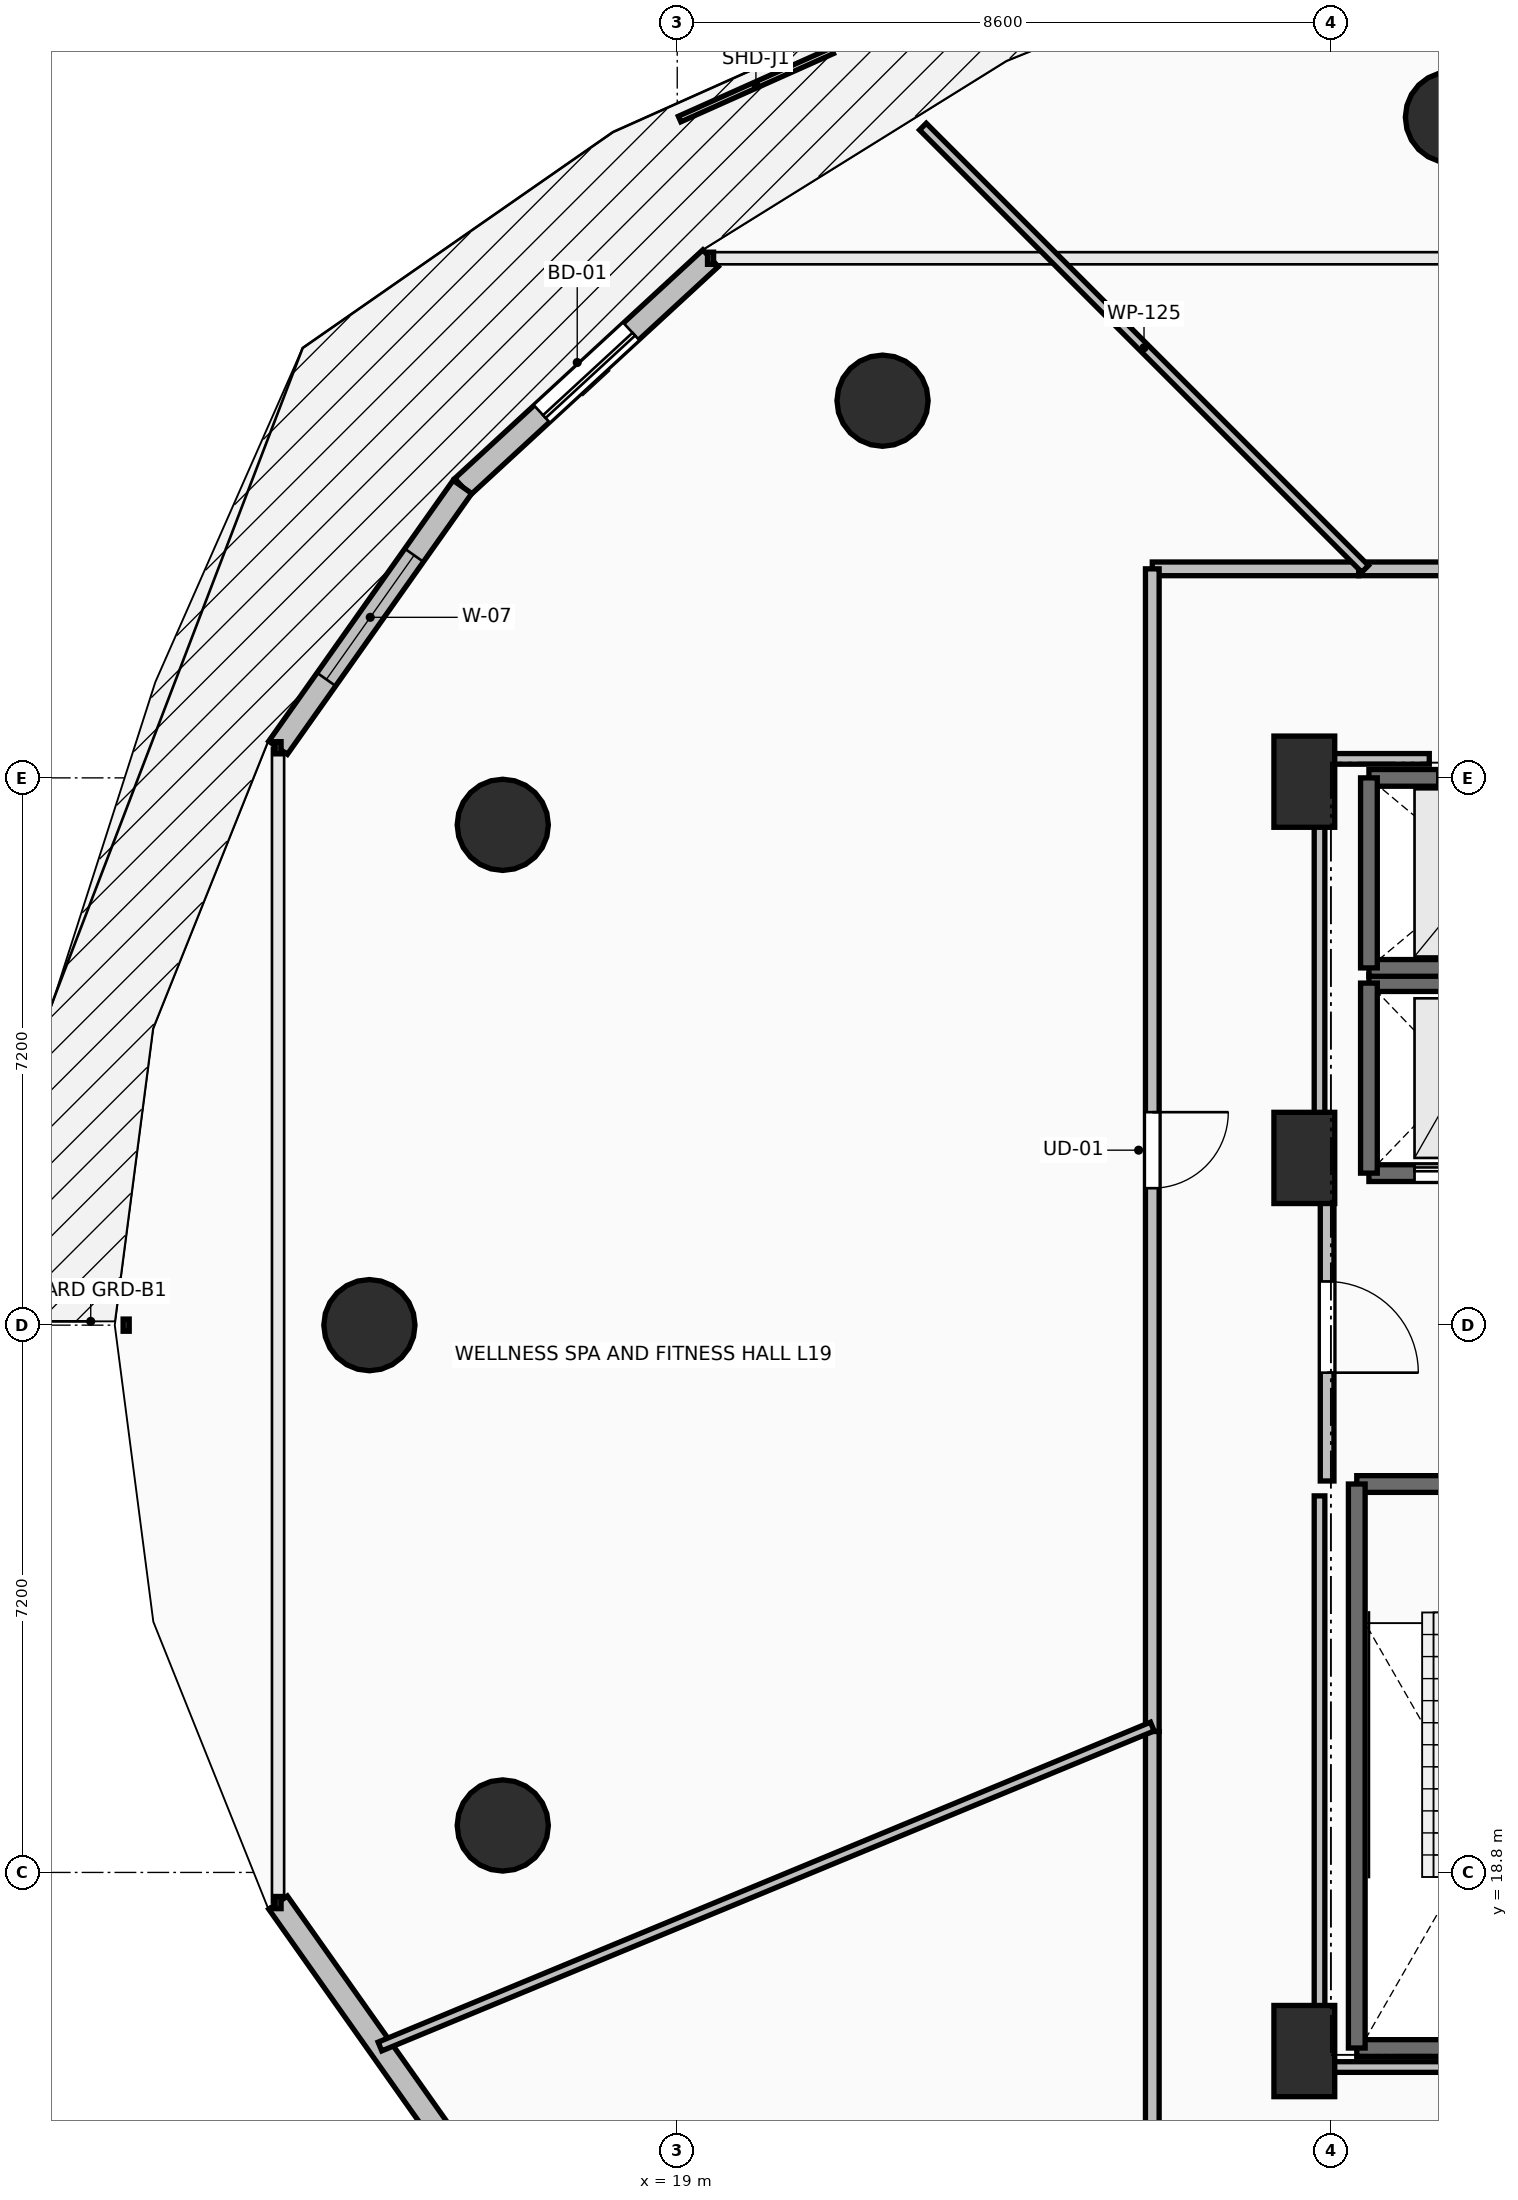
"""IFC4 building model, lengths in metres.
Left out: names, types, materials, properties, quantities, classifications, styles, units other than length and angle.
Written with IfcOpenShell. Run it as: python <this file> out.ifc"""

import sys

from ifc_helpers import new_model, si_unit, direction, frame, frame_2d, origin, origin_2d, place, context, subcontext, project, spatial, rectangle, circle, extrude, element, fill, save


model = new_model("IFC4")
c1 = context("Model", 3, precision=1e-05, world=origin(), true_north=direction((0.0, 1.0)))
c2 = subcontext(c1, "Body", "Model", "MODEL_VIEW")
j1 = project(units=[si_unit("LENGTHUNIT", "METRE"), si_unit("PLANEANGLEUNIT", "RADIAN")], contexts=[c1])
p1 = place(None, origin())
s1 = spatial("IfcSite", under=j1, at=p1, CompositionType="ELEMENT")
p2 = place(p1, origin())
s2 = spatial("IfcBuilding", under=s1, at=p2, CompositionType="ELEMENT")
p3 = place(p2, frame((0.0, 0.0, 74.3)))
s3 = spatial("IfcBuildingStorey", under=s2, at=p3, CompositionType="ELEMENT", Elevation=74.3)
for number, where, z_axis, x_axis in (
    (1, (29.179, 41.891, 0.0), (0.0, 0.0, 1.0), (-0.383, 0.924, 0.0)),
    (2, (21.701, 38.162, 0.0), (0.0, 0.0, 1.0), (-0.707, 0.707, 0.0)),
    (3, (16.705, 32.582, 0.0), (0.0, 0.0, 1.0), (-0.924, 0.383, 0.0)),
    (4, (14.95, 26.0, 0.0), (0.0, 0.0, 1.0), (-1.0, 0.0, 0.0)),
    (5, (16.705, 19.418, 0.0), (0.0, 0.0, 1.0), (-0.924, -0.383, 0.0)),
):
    element("IfcColumn", number, at=place(p3, frame(where, z_axis=z_axis, x_axis=x_axis)), inside=s3, PredefinedType="COLUMN", context=c2, shape_type="SweptSolid", body=[
        extrude(circle(Radius=0.6, at=origin_2d()), origin(), (0.0, 0.0, 1.0), 4.5),
    ])
for number, where, z_axis, x_axis in (
    (6, (27.25, 16.45, 0.0), (0.0, 0.0, 1.0), (1.0, 0.0, 0.0)),
    (7, (27.25, 28.2, 0.0), (0.0, 0.0, 1.0), (1.0, 0.0, 0.0)),
    (8, (27.25, 33.15, 0.0), (0.0, 0.0, 1.0), (1.0, 0.0, 0.0)),
):
    element("IfcColumn", number, at=place(p3, frame(where, z_axis=z_axis, x_axis=x_axis)), inside=s3, PredefinedType="PILASTER", context=c2, shape_type="SweptSolid", body=[
        extrude(rectangle(XDim=0.8, YDim=1.2, at=origin_2d()), origin(), (0.0, 0.0, 1.0), 4.5),
    ])
p4 = place(p3, frame((19.438, 40.036, 0.0), z_axis=(0.0, 0.0, 1.0), x_axis=(-0.735416718093, -0.677615119924, 0.0)))
e9 = element("IfcWall", 9, at=p4, inside=s3, PredefinedType="STANDARD", context=c2, shape_type="SweptSolid", body=[
    extrude(rectangle(XDim=4.439, YDim=0.3, at=frame_2d((2.22, 0.0))), origin(), (0.0, 0.0, 1.0), 4.24),
])
p5 = place(p4, frame((1.419, 0.0, 0.0)))
e10 = element("IfcOpeningElement", 10, at=p5, cuts=e9, PredefinedType="OPENING", context=c2, shape_type="SweptSolid", body=[
    extrude(rectangle(XDim=1.6, YDim=2.3, at=frame_2d((0.8, 1.15))), frame((0.0, 0.165, 0.0), z_axis=(0.0, -1.0, 0.0), x_axis=(1.0, 0.0, 0.0)), (0.0, 0.0, 1.0), 0.33),
])
p6 = place(p3, frame((16.174, 37.028, 0.0), z_axis=(0.0, 0.0, 1.0), x_axis=(-0.57716435238, -0.81662801222, 0.0)))
e11 = element("IfcWall", 11, at=p6, inside=s3, PredefinedType="STANDARD", context=c2, shape_type="SweptSolid", body=[
    extrude(rectangle(XDim=4.202, YDim=0.3, at=frame_2d((2.101, 0.0))), origin(), (0.0, 0.0, 1.0), 4.24),
])
p7 = place(p6, frame((1.101, 0.0, 0.85)))
e12 = element("IfcOpeningElement", 12, at=p7, cuts=e11, PredefinedType="OPENING", context=c2, shape_type="SweptSolid", body=[
    extrude(rectangle(XDim=2.0, YDim=2.45, at=frame_2d((1.0, 1.225))), frame((0.0, 0.165, 0.0), z_axis=(0.0, -1.0, 0.0), x_axis=(1.0, 0.0, 0.0)), (0.0, 0.0, 1.0), 0.33),
])
p8 = place(p3, frame((13.748, 18.404, 0.0), z_axis=(0.0, 0.0, 1.0), x_axis=(0.57716435238, -0.81662801222, 0.0)))
e13 = element("IfcWall", 13, at=p8, inside=s3, PredefinedType="STANDARD", context=c2, shape_type="SweptSolid", body=[
    extrude(rectangle(XDim=4.202, YDim=0.3, at=frame_2d((2.101, 0.0))), origin(), (0.0, 0.0, 1.0), 4.24),
])
p9 = place(p3, frame((27.94, 23.91, 0.0), z_axis=(0.0, 0.0, 1.0), x_axis=(1.0, 0.0, 0.0)))
e14 = element("IfcWall", 14, at=p9, inside=s3, PredefinedType="SOLIDWALL", context=c2, shape_type="SweptSolid", body=[
    extrude(rectangle(XDim=3.37, YDim=0.22, at=frame_2d((1.685, 0.0))), origin(), (0.0, 0.0, 1.0), 4.24),
])
p10 = place(p9, frame((1.135, 0.0, 0.0)))
e15 = element("IfcOpeningElement", 15, at=p10, cuts=e14, PredefinedType="OPENING", context=c2, shape_type="SweptSolid", body=[
    extrude(rectangle(XDim=1.1, YDim=2.15, at=frame_2d((0.55, 1.075))), frame((0.0, 0.125, 0.0), z_axis=(0.0, -1.0, 0.0), x_axis=(1.0, 0.0, 0.0)), (0.0, 0.0, 1.0), 0.25),
])
p11 = place(p3, frame((31.31, 16.49, 0.0), z_axis=(0.0, 0.0, 1.0), x_axis=(-1.0, 0.0, 0.0)))
e16 = element("IfcWall", 16, at=p11, inside=s3, PredefinedType="SOLIDWALL", context=c2, shape_type="SweptSolid", body=[
    extrude(rectangle(XDim=3.37, YDim=0.22, at=frame_2d((1.685, 0.0))), origin(), (0.0, 0.0, 1.0), 4.24),
])
p12 = place(p3, frame((27.94, 16.49, 0.0), z_axis=(0.0, 0.0, 1.0), x_axis=(0.0, 1.0, 0.0)))
e17 = element("IfcWall", 17, at=p12, inside=s3, PredefinedType="SOLIDWALL", context=c2, shape_type="SweptSolid", body=[
    extrude(rectangle(XDim=7.42, YDim=0.22, at=frame_2d((3.71, 0.0))), origin(), (0.0, 0.0, 1.0), 4.24),
])
p13 = place(p3, frame((28.1, 28.0, 0.0), z_axis=(0.0, 0.0, 1.0), x_axis=(1.0, 0.0, 0.0)))
e18 = element("IfcWall", 18, at=p13, inside=s3, PredefinedType="SHEAR", context=c2, shape_type="SweptSolid", body=[
    extrude(rectangle(XDim=2.4, YDim=0.22, at=frame_2d((1.2, 0.0))), origin(), (0.0, 0.0, 1.0), 4.24),
])
p14 = place(p13, frame((0.6, 0.0, 0.0)))
e19 = element("IfcOpeningElement", 19, at=p14, cuts=e18, PredefinedType="OPENING", context=c2, shape_type="SweptSolid", body=[
    extrude(rectangle(XDim=1.2, YDim=2.2, at=frame_2d((0.6, 1.1))), frame((0.0, 0.125, 0.0), z_axis=(0.0, -1.0, 0.0), x_axis=(1.0, 0.0, 0.0)), (0.0, 0.0, 1.0), 0.25),
])
p15 = place(p3, frame((30.5, 30.5, 0.0), z_axis=(0.0, 0.0, 1.0), x_axis=(-1.0, 0.0, 0.0)))
e20 = element("IfcWall", 20, at=p15, inside=s3, PredefinedType="SHEAR", context=c2, shape_type="SweptSolid", body=[
    extrude(rectangle(XDim=2.4, YDim=0.22, at=frame_2d((1.2, 0.0))), origin(), (0.0, 0.0, 1.0), 4.24),
])
p16 = place(p3, frame((28.1, 30.5, 0.0), z_axis=(0.0, 0.0, 1.0), x_axis=(0.0, -1.0, 0.0)))
e21 = element("IfcWall", 21, at=p16, inside=s3, PredefinedType="SHEAR", context=c2, shape_type="SweptSolid", body=[
    extrude(rectangle(XDim=2.5, YDim=0.22, at=frame_2d((1.25, 0.0))), origin(), (0.0, 0.0, 1.0), 4.24),
])
p17 = place(p3, frame((28.1, 30.7, 0.0), z_axis=(0.0, 0.0, 1.0), x_axis=(1.0, 0.0, 0.0)))
e22 = element("IfcWall", 22, at=p17, inside=s3, PredefinedType="SOLIDWALL", context=c2, shape_type="SweptSolid", body=[
    extrude(rectangle(XDim=3.0, YDim=0.22, at=frame_2d((1.5, 0.0))), origin(), (0.0, 0.0, 1.0), 4.24),
])
p18 = place(p3, frame((31.1, 33.2, 0.0), z_axis=(0.0, 0.0, 1.0), x_axis=(-1.0, 0.0, 0.0)))
e23 = element("IfcWall", 23, at=p18, inside=s3, PredefinedType="SOLIDWALL", context=c2, shape_type="SweptSolid", body=[
    extrude(rectangle(XDim=3.0, YDim=0.22, at=frame_2d((1.5, 0.0))), origin(), (0.0, 0.0, 1.0), 4.24),
])
p19 = place(p18, frame((0.9, 0.0, 0.0)))
e24 = element("IfcOpeningElement", 24, at=p19, cuts=e23, PredefinedType="OPENING", context=c2, shape_type="SweptSolid", body=[
    extrude(rectangle(XDim=1.2, YDim=2.2, at=frame_2d((0.6, 1.1))), frame((0.0, 0.125, 0.0), z_axis=(0.0, -1.0, 0.0), x_axis=(1.0, 0.0, 0.0)), (0.0, 0.0, 1.0), 0.25),
])
p20 = place(p3, frame((28.1, 33.2, 0.0), z_axis=(0.0, 0.0, 1.0), x_axis=(0.0, -1.0, 0.0)))
e25 = element("IfcWall", 25, at=p20, inside=s3, PredefinedType="SOLIDWALL", context=c2, shape_type="SweptSolid", body=[
    extrude(rectangle(XDim=2.5, YDim=0.22, at=frame_2d((1.25, 0.0))), origin(), (0.0, 0.0, 1.0), 4.24),
])
p21 = place(p3, frame((27.55, 28.0, 0.0), z_axis=(0.0, 0.0, 1.0), x_axis=(0.0, -1.0, 0.0)))
e26 = element("IfcWall", 26, at=p21, inside=s3, PredefinedType="PARTITIONING", context=c2, shape_type="SweptSolid", body=[
    extrude(rectangle(XDim=4.05, YDim=0.18, at=frame_2d((2.025, 0.0))), origin(), (0.0, 0.0, 1.0), 4.24),
])
p22 = place(p21, frame((1.425, 0.0, 0.0)))
e27 = element("IfcOpeningElement", 27, at=p22, cuts=e26, PredefinedType="OPENING", context=c2, shape_type="SweptSolid", body=[
    extrude(rectangle(XDim=1.2, YDim=2.15, at=frame_2d((0.6, 1.075))), frame((0.0, 0.105, 0.0), z_axis=(0.0, -1.0, 0.0), x_axis=(1.0, 0.0, 0.0)), (0.0, 0.0, 1.0), 0.21),
])
p23 = place(p3, frame((42.061, 35.95, 0.0), z_axis=(0.0, 0.0, 1.0), x_axis=(-1.0, 0.0, 0.0)))
e28 = element("IfcWall", 28, at=p23, inside=s3, PredefinedType="PARTITIONING", context=c2, shape_type="SweptSolid", body=[
    extrude(rectangle(XDim=14.096, YDim=0.18, at=frame_2d((7.048, 0.0))), origin(), (0.0, 0.0, 1.0), 3.432),
])
p24 = place(p23, frame((6.548, 0.0, 0.0)))
e29 = element("IfcOpeningElement", 29, at=p24, cuts=e28, PredefinedType="OPENING", context=c2, shape_type="SweptSolid", body=[
    extrude(rectangle(XDim=1.0, YDim=2.15, at=frame_2d((0.5, 1.075))), frame((0.0, 0.105, 0.0), z_axis=(0.0, -1.0, 0.0), x_axis=(1.0, 0.0, 0.0)), (0.0, 0.0, 1.0), 0.21),
])
p25 = place(p3, frame((27.965, 35.95, 0.0), z_axis=(0.0, 0.0, 1.0), x_axis=(-1.0, 0.0, 0.0)))
e30 = element("IfcWall", 30, at=p25, inside=s3, PredefinedType="PARTITIONING", context=c2, shape_type="SweptSolid", body=[
    extrude(rectangle(XDim=2.715, YDim=0.18, at=frame_2d((1.357, 0.0))), origin(), (0.0, 0.0, 1.0), 3.432),
])
p26 = place(p3, frame((25.25, 35.95, 0.0), z_axis=(0.0, 0.0, 1.0), x_axis=(0.0, -1.0, 0.0)))
e31 = element("IfcWall", 31, at=p26, inside=s3, PredefinedType="PARTITIONING", context=c2, shape_type="SweptSolid", body=[
    extrude(rectangle(XDim=15.296, YDim=0.18, at=frame_2d((7.648, 0.0))), origin(), (0.0, 0.0, 1.0), 3.432),
])
p27 = place(p26, frame((7.148, 0.0, 0.0)))
e32 = element("IfcOpeningElement", 32, at=p27, cuts=e31, PredefinedType="OPENING", context=c2, shape_type="SweptSolid", body=[
    extrude(rectangle(XDim=1.0, YDim=2.15, at=frame_2d((0.5, 1.075))), frame((0.0, 0.105, 0.0), z_axis=(0.0, -1.0, 0.0), x_axis=(1.0, 0.0, 0.0)), (0.0, 0.0, 1.0), 0.21),
])
p28 = place(p3, frame((25.25, 20.654, 0.0), z_axis=(0.0, 0.0, 1.0), x_axis=(0.0, -1.0, 0.0)))
e33 = element("IfcWall", 33, at=p28, inside=s3, PredefinedType="PARTITIONING", context=c2, shape_type="SweptSolid", body=[
    extrude(rectangle(XDim=6.554, YDim=0.18, at=frame_2d((3.277, 0.0))), origin(), (0.0, 0.0, 1.0), 3.432),
])
p29 = place(p3, frame((22.232, 41.768, 0.0), z_axis=(0.0, 0.0, 1.0), x_axis=(0.707106781187, -0.707106781187, 0.0)))
e34 = element("IfcWall", 34, at=p29, inside=s3, PredefinedType="PARTITIONING", context=c2, shape_type="SweptSolid", body=[
    extrude(rectangle(XDim=8.228, YDim=0.125, at=frame_2d((4.114, 0.0))), origin(), (0.0, 0.0, 1.0), 3.432),
])
p30 = place(p3, frame((15.089, 16.51, 0.0), z_axis=(0.0, 0.0, 1.0), x_axis=(0.923872894692, 0.382699457086, 0.0)))
e35 = element("IfcWall", 35, at=p30, inside=s3, PredefinedType="PARTITIONING", context=c2, shape_type="SweptSolid", body=[
    extrude(rectangle(XDim=10.998, YDim=0.125, at=frame_2d((5.499, 0.0))), origin(), (0.0, 0.0, 1.0), 3.432),
])
p31 = place(p3, frame((31.195, 16.24, 0.0), z_axis=(0.0, 0.0, 1.0), x_axis=(-1.0, 0.0, 0.0)))
e36 = element("IfcWall", 36, at=p31, inside=s3, PredefinedType="PARTITIONING", context=c2, shape_type="SweptSolid", body=[
    extrude(rectangle(XDim=3.745, YDim=0.14, at=frame_2d((1.873, 0.0))), origin(), (0.0, 0.0, 1.0), 3.432),
])
p32 = place(p3, frame((27.45, 16.24, 0.0), z_axis=(0.0, 0.0, 1.0), x_axis=(0.0, 1.0, 0.0)))
e37 = element("IfcWall", 37, at=p32, inside=s3, PredefinedType="PARTITIONING", context=c2, shape_type="SweptSolid", body=[
    extrude(rectangle(XDim=7.514, YDim=0.14, at=frame_2d((3.757, 0.0))), origin(), (0.0, 0.0, 1.0), 3.432),
])
p33 = place(p3, frame((27.45, 28.196, 0.0), z_axis=(0.0, 0.0, 1.0), x_axis=(0.0, 1.0, 0.0)))
e38 = element("IfcWall", 38, at=p33, inside=s3, PredefinedType="PARTITIONING", context=c2, shape_type="SweptSolid", body=[
    extrude(rectangle(XDim=5.254, YDim=0.14, at=frame_2d((2.627, 0.0))), origin(), (0.0, 0.0, 1.0), 3.432),
])
p34 = place(p3, frame((27.45, 33.45, 0.0), z_axis=(0.0, 0.0, 1.0), x_axis=(1.0, 0.0, 0.0)))
e39 = element("IfcWall", 39, at=p34, inside=s3, PredefinedType="PARTITIONING", context=c2, shape_type="SweptSolid", body=[
    extrude(rectangle(XDim=1.444, YDim=0.14, at=frame_2d((0.722, 0.0))), origin(), (0.0, 0.0, 1.0), 3.432),
])
p35 = place(p5, origin())
e40 = element("IfcDoor", 40, at=p35, inside=s3, OperationType="SLIDING_TO_LEFT", PredefinedType="DOOR", context=c2, shape_type="SweptSolid", body=[
    extrude(rectangle(XDim=1.6, YDim=2.3, at=frame_2d((0.8, 1.15))), frame((0.0, 0.025, 0.0), z_axis=(0.0, -1.0, 0.0), x_axis=(1.0, 0.0, 0.0)), (0.0, 0.0, 1.0), 0.05),
])
fill(e10, e40)
p36 = place(p7, origin())
e41 = element("IfcWindow", 41, at=p36, inside=s3, PartitioningType="SINGLE_PANEL", PredefinedType="WINDOW", context=c2, shape_type="SweptSolid", body=[
    extrude(rectangle(XDim=2.0, YDim=2.45, at=frame_2d((1.0, 1.225))), frame((0.0, 0.03, 0.0), z_axis=(0.0, -1.0, 0.0), x_axis=(1.0, 0.0, 0.0)), (0.0, 0.0, 1.0), 0.06),
])
fill(e12, e41)
p37 = place(p14, origin())
e42 = element("IfcDoor", 42, at=p37, inside=s3, OperationType="SLIDING_TO_LEFT", PredefinedType="DOOR", context=c2, shape_type="SweptSolid", body=[
    extrude(rectangle(XDim=1.2, YDim=2.2, at=frame_2d((0.6, 1.1))), frame((0.0, 0.025, 0.0), z_axis=(0.0, -1.0, 0.0), x_axis=(1.0, 0.0, 0.0)), (0.0, 0.0, 1.0), 0.05),
])
fill(e19, e42)
p38 = place(p19, origin())
e43 = element("IfcDoor", 43, at=p38, inside=s3, OperationType="SLIDING_TO_LEFT", PredefinedType="DOOR", context=c2, shape_type="SweptSolid", body=[
    extrude(rectangle(XDim=1.2, YDim=2.2, at=frame_2d((0.6, 1.1))), frame((0.0, 0.025, 0.0), z_axis=(0.0, -1.0, 0.0), x_axis=(1.0, 0.0, 0.0)), (0.0, 0.0, 1.0), 0.05),
])
fill(e24, e43)
p39 = place(p22, origin())
e44 = element("IfcDoor", 44, at=p39, inside=s3, OperationType="SINGLE_SWING_RIGHT", PredefinedType="DOOR", context=c2, shape_type="SweptSolid", body=[
    extrude(rectangle(XDim=1.2, YDim=2.15, at=frame_2d((0.6, 1.075))), frame((0.0, 0.025, 0.0), z_axis=(0.0, -1.0, 0.0), x_axis=(1.0, 0.0, 0.0)), (0.0, 0.0, 1.0), 0.05),
])
fill(e27, e44)
p40 = place(p27, origin())
e45 = element("IfcDoor", 45, at=p40, inside=s3, OperationType="SINGLE_SWING_LEFT", PredefinedType="DOOR", context=c2, shape_type="SweptSolid", body=[
    extrude(rectangle(XDim=1.0, YDim=2.15, at=frame_2d((0.5, 1.075))), frame((0.0, 0.025, 0.0), z_axis=(0.0, -1.0, 0.0), x_axis=(1.0, 0.0, 0.0)), (0.0, 0.0, 1.0), 0.05),
])
fill(e32, e45)
save(model, sys.argv[1])
